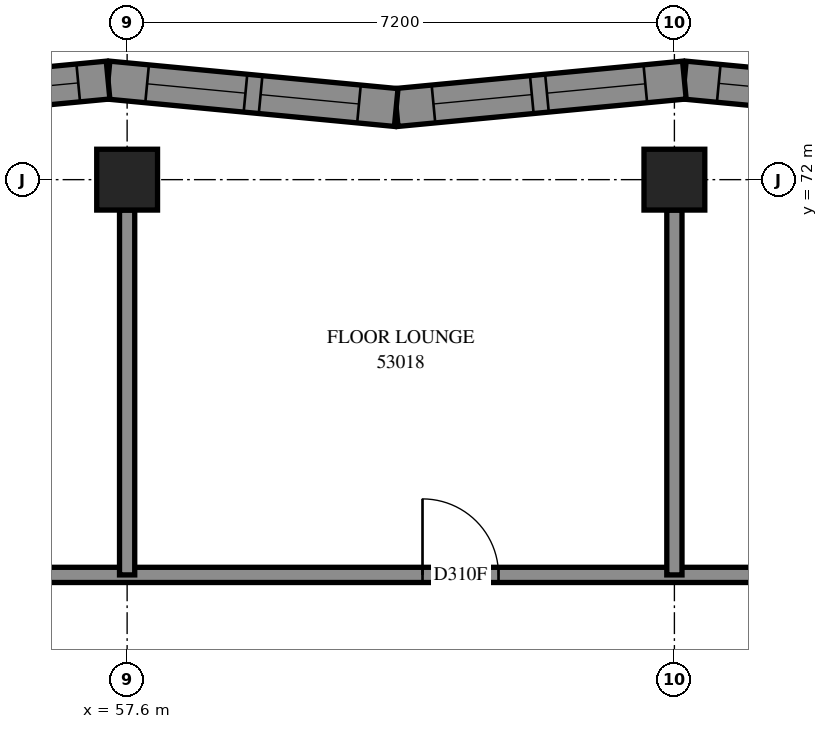
"""IFC4 building model, lengths in metres.
Left out: names, types, materials, properties, quantities, classifications, styles, units other than length and angle.
Written with IfcOpenShell. Run it as: python <this file> out.ifc"""

import sys

from ifc_helpers import new_model, si_unit, direction, frame, frame_2d, origin, origin_2d, place, context, subcontext, project, spatial, polyline, rectangle, outline, extrude, element, fill, save


model = new_model("IFC4")
c1 = context("Model", 3, precision=1e-05, world=origin(), true_north=direction((0.0, 1.0)))
c2 = subcontext(c1, "Body", "Model", "MODEL_VIEW")
j1 = project(units=[si_unit("LENGTHUNIT", "METRE"), si_unit("PLANEANGLEUNIT", "RADIAN")], contexts=[c1])
p1 = place(None, origin())
s1 = spatial("IfcSite", under=j1, at=p1, CompositionType="ELEMENT")
p2 = place(p1, origin())
s2 = spatial("IfcBuilding", under=s1, at=p2, CompositionType="ELEMENT")
p3 = place(p2, frame((0.0, 0.0, 196.4)))
s3 = spatial("IfcBuildingStorey", under=s2, at=p3, CompositionType="ELEMENT", Elevation=196.4)
for number, where, z_axis, x_axis in (
    (1, (57.6, 72.0, 0.0), (0.0, 0.0, 1.0), (1.0, 0.0, 0.0)),
    (2, (64.8, 72.0, 0.0), (0.0, 0.0, 1.0), (1.0, 0.0, 0.0)),
):
    element("IfcColumn", number, at=place(p3, frame(where, z_axis=z_axis, x_axis=x_axis)), inside=s3, PredefinedType="COLUMN", context=c2, shape_type="SweptSolid", body=[
        extrude(rectangle(XDim=0.8, YDim=0.8, at=origin_2d()), origin(), (0.0, 0.0, 1.0), 3.1),
    ])
p4 = place(p3, frame((68.722, 72.949, 0.0), z_axis=(0.0, 0.0, 1.0), x_axis=(-0.9954966527, 0.0947967005, 0.0)))
e3 = element("IfcWall", 3, at=p4, inside=s3, PredefinedType="SOLIDWALL", context=c2, shape_type="SweptSolid", body=[
    extrude(outline(polyline([(0.024, -0.25), (3.832, -0.25), (3.784, 0.25), (-0.024, 0.25), (0.024, -0.25)])), origin(), (0.0, 0.0, 1.0), 3.1),
])
p5 = place(p4, frame((0.554, 0.0, 0.45)))
e4 = element("IfcOpeningElement", 4, at=p5, cuts=e3, PredefinedType="OPENING", context=c2, shape_type="SweptSolid", body=[
    extrude(rectangle(XDim=1.3, YDim=2.5, at=frame_2d((0.65, 1.25))), frame((0.0, 0.26, 0.0), z_axis=(0.0, -1.0, 0.0), x_axis=(1.0, 0.0, 0.0)), (0.0, 0.0, 1.0), 0.52),
])
p6 = place(p4, frame((2.054, 0.0, 0.45)))
e5 = element("IfcOpeningElement", 5, at=p6, cuts=e3, PredefinedType="OPENING", context=c2, shape_type="SweptSolid", body=[
    extrude(rectangle(XDim=1.3, YDim=2.5, at=frame_2d((0.65, 1.25))), frame((0.0, 0.26, 0.0), z_axis=(0.0, -1.0, 0.0), x_axis=(1.0, 0.0, 0.0)), (0.0, 0.0, 1.0), 0.52),
])
p7 = place(p3, frame((64.931, 73.31, 0.0), z_axis=(0.0, 0.0, 1.0), x_axis=(-0.9954966527, -0.0947967005, 0.0)))
e6 = element("IfcWall", 6, at=p7, inside=s3, PredefinedType="SOLIDWALL", context=c2, shape_type="SweptSolid", body=[
    extrude(outline(polyline([(-0.024, -0.25), (3.784, -0.25), (3.832, 0.25), (0.024, 0.25), (-0.024, -0.25)])), origin(), (0.0, 0.0, 1.0), 3.1),
])
p8 = place(p7, frame((0.516, 0.0, 0.45)))
e7 = element("IfcOpeningElement", 7, at=p8, cuts=e6, PredefinedType="OPENING", context=c2, shape_type="SweptSolid", body=[
    extrude(rectangle(XDim=1.3, YDim=2.5, at=frame_2d((0.65, 1.25))), frame((0.0, 0.26, 0.0), z_axis=(0.0, -1.0, 0.0), x_axis=(1.0, 0.0, 0.0)), (0.0, 0.0, 1.0), 0.52),
])
p9 = place(p7, frame((2.016, 0.0, 0.45)))
e8 = element("IfcOpeningElement", 8, at=p9, cuts=e6, PredefinedType="OPENING", context=c2, shape_type="SweptSolid", body=[
    extrude(rectangle(XDim=1.3, YDim=2.5, at=frame_2d((0.65, 1.25))), frame((0.0, 0.26, 0.0), z_axis=(0.0, -1.0, 0.0), x_axis=(1.0, 0.0, 0.0)), (0.0, 0.0, 1.0), 0.52),
])
p10 = place(p3, frame((61.14, 72.949, 0.0), z_axis=(0.0, 0.0, 1.0), x_axis=(-0.9954966527, 0.0947967005, 0.0)))
e9 = element("IfcWall", 9, at=p10, inside=s3, PredefinedType="SOLIDWALL", context=c2, shape_type="SweptSolid", body=[
    extrude(outline(polyline([(0.024, -0.25), (3.832, -0.25), (3.784, 0.25), (-0.024, 0.25), (0.024, -0.25)])), origin(), (0.0, 0.0, 1.0), 3.1),
])
p11 = place(p10, frame((0.492, 0.0, 0.45)))
e10 = element("IfcOpeningElement", 10, at=p11, cuts=e9, PredefinedType="OPENING", context=c2, shape_type="SweptSolid", body=[
    extrude(rectangle(XDim=1.3, YDim=2.5, at=frame_2d((0.65, 1.25))), frame((0.0, 0.26, 0.0), z_axis=(0.0, -1.0, 0.0), x_axis=(1.0, 0.0, 0.0)), (0.0, 0.0, 1.0), 0.52),
])
p12 = place(p10, frame((1.992, 0.0, 0.45)))
e11 = element("IfcOpeningElement", 11, at=p12, cuts=e9, PredefinedType="OPENING", context=c2, shape_type="SweptSolid", body=[
    extrude(rectangle(XDim=1.3, YDim=2.5, at=frame_2d((0.65, 1.25))), frame((0.0, 0.26, 0.0), z_axis=(0.0, -1.0, 0.0), x_axis=(1.0, 0.0, 0.0)), (0.0, 0.0, 1.0), 0.52),
])
p13 = place(p3, frame((57.349, 73.31, 0.0), z_axis=(0.0, 0.0, 1.0), x_axis=(-0.9954966527, -0.0947967005, 0.0)))
e12 = element("IfcWall", 12, at=p13, inside=s3, PredefinedType="SOLIDWALL", context=c2, shape_type="SweptSolid", body=[
    extrude(outline(polyline([(-0.024, -0.25), (3.784, -0.25), (3.832, 0.25), (0.024, 0.25), (-0.024, -0.25)])), origin(), (0.0, 0.0, 1.0), 3.1),
])
p14 = place(p13, frame((0.394, 0.0, 0.45)))
e13 = element("IfcOpeningElement", 13, at=p14, cuts=e12, PredefinedType="OPENING", context=c2, shape_type="SweptSolid", body=[
    extrude(rectangle(XDim=1.3, YDim=2.5, at=frame_2d((0.65, 1.25))), frame((0.0, 0.26, 0.0), z_axis=(0.0, -1.0, 0.0), x_axis=(1.0, 0.0, 0.0)), (0.0, 0.0, 1.0), 0.52),
])
p15 = place(p13, frame((1.894, 0.0, 0.45)))
e14 = element("IfcOpeningElement", 14, at=p15, cuts=e12, PredefinedType="OPENING", context=c2, shape_type="SweptSolid", body=[
    extrude(rectangle(XDim=1.3, YDim=2.5, at=frame_2d((0.65, 1.25))), frame((0.0, 0.26, 0.0), z_axis=(0.0, -1.0, 0.0), x_axis=(1.0, 0.0, 0.0)), (0.0, 0.0, 1.0), 0.52),
])
p16 = place(p3, frame((55.6, 66.8, 0.0), z_axis=(0.0, 0.0, 1.0), x_axis=(1.0, 0.0, 0.0)))
e15 = element("IfcWall", 15, at=p16, inside=s3, PredefinedType="PARTITIONING", context=c2, shape_type="SweptSolid", body=[
    extrude(rectangle(XDim=18.4, YDim=0.2, at=frame_2d((9.2, 0.0))), origin(), (0.0, 0.0, 1.0), 3.1),
])
p17 = place(p16, frame((5.886, 0.0, 0.0)))
e16 = element("IfcOpeningElement", 16, at=p17, cuts=e15, PredefinedType="OPENING", context=c2, shape_type="SweptSolid", body=[
    extrude(rectangle(XDim=1.0, YDim=2.1, at=frame_2d((0.5, 1.05))), frame((0.0, 0.11, 0.0), z_axis=(0.0, -1.0, 0.0), x_axis=(1.0, 0.0, 0.0)), (0.0, 0.0, 1.0), 0.22),
])
p18 = place(p16, frame((13.389, 0.0, 0.0)))
e17 = element("IfcOpeningElement", 17, at=p18, cuts=e15, PredefinedType="OPENING", context=c2, shape_type="SweptSolid", body=[
    extrude(rectangle(XDim=1.0, YDim=2.1, at=frame_2d((0.5, 1.05))), frame((0.0, 0.11, 0.0), z_axis=(0.0, -1.0, 0.0), x_axis=(1.0, 0.0, 0.0)), (0.0, 0.0, 1.0), 0.22),
])
for number, where, z_axis, x_axis in (
    (18, (57.6, 66.8, 0.0), (0.0, 0.0, 1.0), (0.0, 1.0, 0.0)),
    (19, (64.8, 66.8, 0.0), (0.0, 0.0, 1.0), (0.0, 1.0, 0.0)),
):
    element("IfcWall", number, at=place(p3, frame(where, z_axis=z_axis, x_axis=x_axis)), inside=s3, PredefinedType="PARTITIONING", context=c2, shape_type="SweptSolid", body=[
        extrude(rectangle(XDim=4.8, YDim=0.2, at=frame_2d((2.4, 0.0))), origin(), (0.0, 0.0, 1.0), 3.1),
    ])
p19 = place(p6, origin())
e20 = element("IfcWindow", 20, at=p19, inside=s3, PartitioningType="SINGLE_PANEL", PredefinedType="WINDOW", context=c2, shape_type="SweptSolid", body=[
    extrude(rectangle(XDim=1.3, YDim=2.5, at=frame_2d((0.65, 1.25))), frame((0.0, 0.18, 0.0), z_axis=(0.0, -1.0, 0.0), x_axis=(1.0, 0.0, 0.0)), (0.0, 0.0, 1.0), 0.06),
])
fill(e5, e20)
p20 = place(p8, origin())
e21 = element("IfcWindow", 21, at=p20, inside=s3, PartitioningType="SINGLE_PANEL", PredefinedType="WINDOW", context=c2, shape_type="SweptSolid", body=[
    extrude(rectangle(XDim=1.3, YDim=2.5, at=frame_2d((0.65, 1.25))), frame((0.0, 0.18, 0.0), z_axis=(0.0, -1.0, 0.0), x_axis=(1.0, 0.0, 0.0)), (0.0, 0.0, 1.0), 0.06),
])
fill(e7, e21)
p21 = place(p9, origin())
e22 = element("IfcWindow", 22, at=p21, inside=s3, PartitioningType="SINGLE_PANEL", PredefinedType="WINDOW", context=c2, shape_type="SweptSolid", body=[
    extrude(rectangle(XDim=1.3, YDim=2.5, at=frame_2d((0.65, 1.25))), frame((0.0, 0.18, 0.0), z_axis=(0.0, -1.0, 0.0), x_axis=(1.0, 0.0, 0.0)), (0.0, 0.0, 1.0), 0.06),
])
fill(e8, e22)
p22 = place(p11, origin())
e23 = element("IfcWindow", 23, at=p22, inside=s3, PartitioningType="SINGLE_PANEL", PredefinedType="WINDOW", context=c2, shape_type="SweptSolid", body=[
    extrude(rectangle(XDim=1.3, YDim=2.5, at=frame_2d((0.65, 1.25))), frame((0.0, 0.18, 0.0), z_axis=(0.0, -1.0, 0.0), x_axis=(1.0, 0.0, 0.0)), (0.0, 0.0, 1.0), 0.06),
])
fill(e10, e23)
p23 = place(p12, origin())
e24 = element("IfcWindow", 24, at=p23, inside=s3, PartitioningType="SINGLE_PANEL", PredefinedType="WINDOW", context=c2, shape_type="SweptSolid", body=[
    extrude(rectangle(XDim=1.3, YDim=2.5, at=frame_2d((0.65, 1.25))), frame((0.0, 0.18, 0.0), z_axis=(0.0, -1.0, 0.0), x_axis=(1.0, 0.0, 0.0)), (0.0, 0.0, 1.0), 0.06),
])
fill(e11, e24)
p24 = place(p14, origin())
e25 = element("IfcWindow", 25, at=p24, inside=s3, PartitioningType="SINGLE_PANEL", PredefinedType="WINDOW", context=c2, shape_type="SweptSolid", body=[
    extrude(rectangle(XDim=1.3, YDim=2.5, at=frame_2d((0.65, 1.25))), frame((0.0, 0.18, 0.0), z_axis=(0.0, -1.0, 0.0), x_axis=(1.0, 0.0, 0.0)), (0.0, 0.0, 1.0), 0.06),
])
fill(e13, e25)
p25 = place(p17, origin())
e26 = element("IfcDoor", 26, at=p25, inside=s3, OperationType="SINGLE_SWING_RIGHT", PredefinedType="DOOR", context=c2, shape_type="SweptSolid", body=[
    extrude(rectangle(XDim=1.0, YDim=2.1, at=frame_2d((0.5, 1.05))), frame((0.0, 0.025, 0.0), z_axis=(0.0, -1.0, 0.0), x_axis=(1.0, 0.0, 0.0)), (0.0, 0.0, 1.0), 0.05),
])
fill(e16, e26)
save(model, sys.argv[1])
